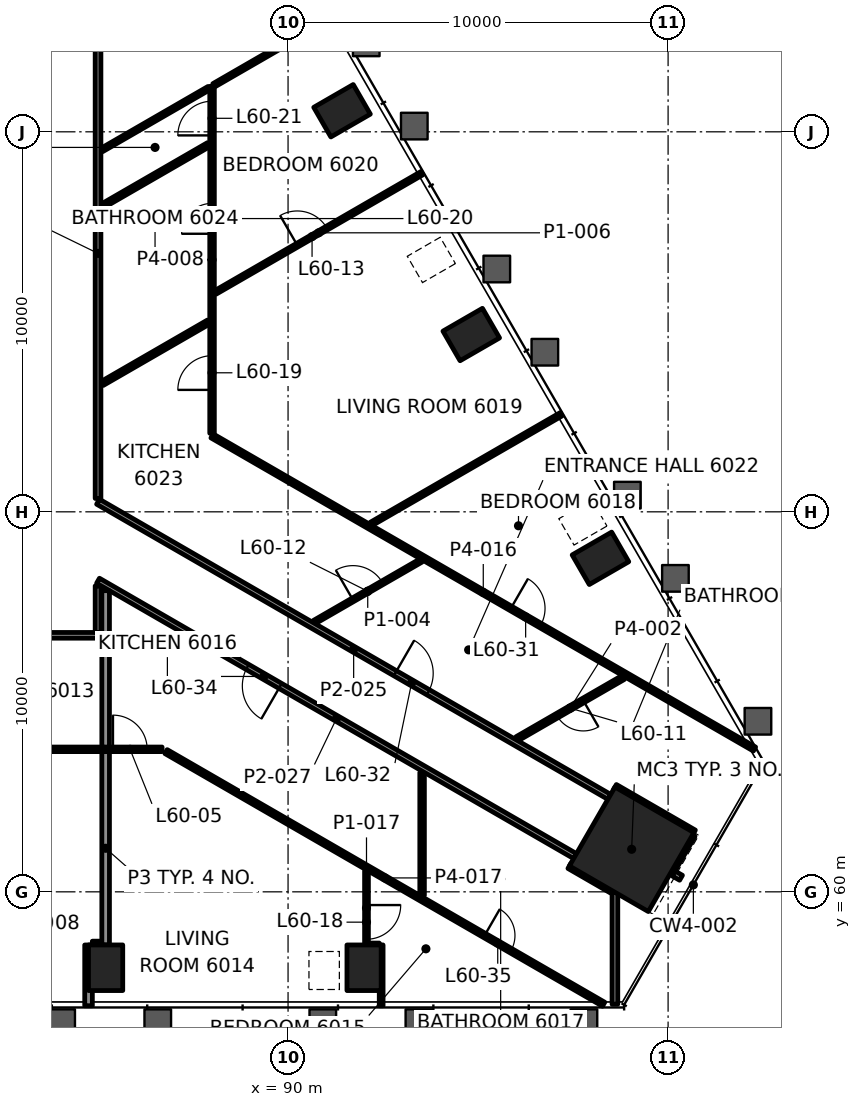
"""IFC4 building model, lengths in metres.
Left out: names, types, materials, properties, quantities, classifications, styles, units other than length and angle.
Written with IfcOpenShell. Run it as: python <this file> out.ifc"""

import sys

from ifc_helpers import new_model, si_unit, direction, frame, frame_2d, origin, origin_2d, place, context, subcontext, project, spatial, rectangle, hollow_rectangle, extrude, element, fill, save


model = new_model("IFC4")
c1 = context("Model", 3, precision=1e-05, world=origin(), true_north=direction((0.0, 1.0)))
c2 = subcontext(c1, "Body", "Model", "MODEL_VIEW")
j1 = project(units=[si_unit("LENGTHUNIT", "METRE"), si_unit("PLANEANGLEUNIT", "RADIAN")], contexts=[c1])
p1 = place(None, origin())
s1 = spatial("IfcSite", under=j1, at=p1, CompositionType="ELEMENT")
p2 = place(p1, origin())
s2 = spatial("IfcBuilding", under=s1, at=p2, CompositionType="ELEMENT")
p3 = place(p2, frame((0.0, 0.0, 256.6)))
s3 = spatial("IfcBuildingStorey", under=s2, at=p3, CompositionType="ELEMENT", Elevation=256.6)
p4 = place(p3, frame((99.041, 61.12, 0.0), z_axis=(0.0, 0.0, 1.0), x_axis=(0.5, 0.866025403784, 0.0)))
e1 = element("IfcColumn", 1, at=p4, inside=s3, PredefinedType="COLUMN", context=c2, shape_type="SweptSolid", body=[
    extrude(rectangle(XDim=2.4, YDim=2.4, at=origin_2d()), origin(), (0.0, 0.0, 1.0), 3.5),
])
for number, where, z_axis, x_axis in (
    (2, (85.2, 58.002, -0.0), (0.0, 0.0, 1.0), (1.0, 0.0, 0.0)),
    (3, (92.0, 58.002, -0.0), (0.0, 0.0, 1.0), (1.0, 0.0, 0.0)),
    (4, (98.22, 68.777, -0.0), (0.0, 0.0, 1.0), (-0.5, 0.866, 0.0)),
    (5, (94.821, 74.666, -0.0), (0.0, 0.0, 1.0), (-0.5, 0.866, 0.0)),
    (6, (91.421, 80.554, -0.0), (0.0, 0.0, 1.0), (-0.5, 0.866, 0.0)),
):
    element("IfcColumn", number, at=place(p3, frame(where, z_axis=z_axis, x_axis=x_axis)), inside=s3, PredefinedType="COLUMN", context=c2, shape_type="SweptSolid", body=[
        extrude(hollow_rectangle(XDim=0.9, YDim=1.2, WallThickness=0.06, at=origin_2d()), origin(), (0.0, 0.0, 1.0), 3.5),
    ])
p5 = place(p3, frame((84.851, 58.602, 0.0), z_axis=(0.0, 0.0, 1.0), x_axis=(1.0, 0.0, 0.0)))
e7 = element("IfcWall", 7, at=p5, inside=s3, PredefinedType="PARTITIONING", context=c2, shape_type="SweptSolid", body=[
    extrude(rectangle(XDim=0.249, YDim=0.2, at=frame_2d((0.125, 0.0))), origin(), (0.0, 0.0, 1.0), 2.7),
])
p6 = place(p3, frame((92.114, 58.602, 0.0), z_axis=(0.0, 0.0, 1.0), x_axis=(1.0, 0.0, 0.0)))
e8 = element("IfcWall", 8, at=p6, inside=s3, PredefinedType="PARTITIONING", context=c2, shape_type="SweptSolid", body=[
    extrude(rectangle(XDim=0.286, YDim=0.1, at=frame_2d((0.143, 0.0))), origin(), (0.0, 0.0, 1.0), 2.7),
])
p7 = place(p3, frame((63.314, 63.75, 0.0), z_axis=(0.0, 0.0, 1.0), x_axis=(1.0, 0.0, 0.0)))
e9 = element("IfcWall", 9, at=p7, inside=s3, PredefinedType="PARTITIONING", context=c2, shape_type="SweptSolid", body=[
    extrude(rectangle(XDim=23.371, YDim=0.12, at=frame_2d((11.686, 0.0))), origin(), (0.0, 0.0, 1.0), 2.7),
])
p8 = place(p7, frame((1.372, 0.0, 0.0)))
e10 = element("IfcOpeningElement", 10, at=p8, cuts=e9, PredefinedType="OPENING", context=c2, shape_type="SweptSolid", body=[
    extrude(rectangle(XDim=0.8, YDim=2.1, at=frame_2d((0.4, 1.05))), frame((0.0, 0.07, 0.0), z_axis=(0.0, -1.0, 0.0), x_axis=(1.0, 0.0, 0.0)), (0.0, 0.0, 1.0), 0.14),
])
p9 = place(p7, frame((6.249, 0.0, 0.0)))
e11 = element("IfcOpeningElement", 11, at=p9, cuts=e9, PredefinedType="OPENING", context=c2, shape_type="SweptSolid", body=[
    extrude(rectangle(XDim=0.9, YDim=2.1, at=frame_2d((0.45, 1.05))), frame((0.0, 0.07, 0.0), z_axis=(0.0, -1.0, 0.0), x_axis=(1.0, 0.0, 0.0)), (0.0, 0.0, 1.0), 0.14),
])
p10 = place(p7, frame((12.595, 0.0, 0.0)))
e12 = element("IfcOpeningElement", 12, at=p10, cuts=e9, PredefinedType="OPENING", context=c2, shape_type="SweptSolid", body=[
    extrude(rectangle(XDim=0.9, YDim=2.1, at=frame_2d((0.45, 1.05))), frame((0.0, 0.07, 0.0), z_axis=(0.0, -1.0, 0.0), x_axis=(1.0, 0.0, 0.0)), (0.0, 0.0, 1.0), 0.14),
])
p11 = place(p7, frame((18.992, 0.0, 0.0)))
e13 = element("IfcOpeningElement", 13, at=p11, cuts=e9, PredefinedType="OPENING", context=c2, shape_type="SweptSolid", body=[
    extrude(rectangle(XDim=0.8, YDim=2.1, at=frame_2d((0.4, 1.05))), frame((0.0, 0.07, 0.0), z_axis=(0.0, -1.0, 0.0), x_axis=(1.0, 0.0, 0.0)), (0.0, 0.0, 1.0), 0.14),
])
p12 = place(p7, frame((22.078, 0.0, 0.0)))
e14 = element("IfcOpeningElement", 14, at=p12, cuts=e9, PredefinedType="OPENING", context=c2, shape_type="SweptSolid", body=[
    extrude(rectangle(XDim=0.9, YDim=2.1, at=frame_2d((0.45, 1.05))), frame((0.0, 0.07, 0.0), z_axis=(0.0, -1.0, 0.0), x_axis=(1.0, 0.0, 0.0)), (0.0, 0.0, 1.0), 0.14),
])
p13 = place(p3, frame((85.0, 66.75, 0.0), z_axis=(0.0, 0.0, 1.0), x_axis=(-1.0, 0.0, 0.0)))
e15 = element("IfcWall", 15, at=p13, inside=s3, PredefinedType="PARTITIONING", context=c2, shape_type="SweptSolid", body=[
    extrude(rectangle(XDim=20.0, YDim=0.15, at=frame_2d((10.0, 0.0))), origin(), (0.0, 0.0, 1.0), 2.7),
])
p14 = place(p13, frame((14.487, 0.0, 0.0)))
e16 = element("IfcOpeningElement", 16, at=p14, cuts=e15, PredefinedType="OPENING", context=c2, shape_type="SweptSolid", body=[
    extrude(rectangle(XDim=1.0, YDim=2.1, at=frame_2d((0.5, 1.05))), frame((0.0, 0.085, 0.0), z_axis=(0.0, -1.0, 0.0), x_axis=(1.0, 0.0, 0.0)), (0.0, 0.0, 1.0), 0.17),
])
p15 = place(p3, frame((98.82, 65.641, 0.0), z_axis=(0.0, 0.0, 1.0), x_axis=(-0.866033195618, -0.499986503906, 0.0)))
e17 = element("IfcWall", 17, at=p15, inside=s3, PredefinedType="PARTITIONING", context=c2, shape_type="SweptSolid", body=[
    extrude(rectangle(XDim=3.228, YDim=0.12, at=frame_2d((1.614, 0.0))), origin(), (0.0, 0.0, 1.0), 2.7),
])
p16 = place(p15, frame((1.214, 0.0, 0.0)))
e18 = element("IfcOpeningElement", 18, at=p16, cuts=e17, PredefinedType="OPENING", context=c2, shape_type="SweptSolid", body=[
    extrude(rectangle(XDim=0.8, YDim=2.1, at=frame_2d((0.4, 1.05))), frame((0.0, 0.07, 0.0), z_axis=(0.0, -1.0, 0.0), x_axis=(1.0, 0.0, 0.0)), (0.0, 0.0, 1.0), 0.14),
])
p17 = place(p3, frame((90.69, 67.097, 0.0), z_axis=(0.0, 0.0, 1.0), x_axis=(0.86605167102, 0.499954501053, 0.0)))
e19 = element("IfcWall", 19, at=p17, inside=s3, PredefinedType="PARTITIONING", context=c2, shape_type="SweptSolid", body=[
    extrude(rectangle(XDim=3.248, YDim=0.1, at=frame_2d((1.624, 0.0))), origin(), (0.0, 0.0, 1.0), 2.7),
])
p18 = place(p17, frame((1.174, 0.0, 0.0)))
e20 = element("IfcOpeningElement", 20, at=p18, cuts=e19, PredefinedType="OPENING", context=c2, shape_type="SweptSolid", body=[
    extrude(rectangle(XDim=0.9, YDim=2.1, at=frame_2d((0.45, 1.05))), frame((0.0, 0.06, 0.0), z_axis=(0.0, -1.0, 0.0), x_axis=(1.0, 0.0, 0.0)), (0.0, 0.0, 1.0), 0.12),
])
p19 = place(p3, frame((92.186, 69.68, 0.0), z_axis=(0.0, 0.0, 1.0), x_axis=(0.866022942541, 0.500004262974, 0.0)))
e21 = element("IfcWall", 21, at=p19, inside=s3, PredefinedType="PARTITIONING", context=c2, shape_type="SweptSolid", body=[
    extrude(rectangle(XDim=5.774, YDim=0.1, at=frame_2d((2.887, 0.0))), origin(), (0.0, 0.0, 1.0), 2.688),
])
p20 = place(p3, frame((85.11, 73.379, 0.0), z_axis=(0.0, 0.0, 1.0), x_axis=(0.866000447062, 0.500043223821, 0.0)))
e22 = element("IfcWall", 22, at=p20, inside=s3, PredefinedType="PARTITIONING", context=c2, shape_type="SweptSolid", body=[
    extrude(rectangle(XDim=3.228, YDim=0.12, at=frame_2d((1.614, 0.0))), origin(), (0.0, 0.0, 1.0), 2.7),
])
p21 = place(p3, frame((88.086, 75.773, 0.0), z_axis=(0.0, 0.0, 1.0), x_axis=(0.866028229963, 0.499995104884, 0.0)))
e23 = element("IfcWall", 23, at=p21, inside=s3, PredefinedType="PARTITIONING", context=c2, shape_type="SweptSolid", body=[
    extrude(rectangle(XDim=6.278, YDim=0.1, at=frame_2d((3.139, 0.0))), origin(), (0.0, 0.0, 1.0), 2.688),
])
p22 = place(p21, frame((2.489, 0.0, 0.0)))
e24 = element("IfcOpeningElement", 24, at=p22, cuts=e23, PredefinedType="OPENING", context=c2, shape_type="SweptSolid", body=[
    extrude(rectangle(XDim=0.9, YDim=2.1, at=frame_2d((0.45, 1.05))), frame((0.0, 0.06, 0.0), z_axis=(0.0, -1.0, 0.0), x_axis=(1.0, 0.0, 0.0)), (0.0, 0.0, 1.0), 0.12),
])
p23 = place(p3, frame((85.109, 78.046, 0.0), z_axis=(0.0, 0.0, 1.0), x_axis=(0.866033195618, 0.499986503906, 0.0)))
e25 = element("IfcWall", 25, at=p23, inside=s3, PredefinedType="PARTITIONING", context=c2, shape_type="SweptSolid", body=[
    extrude(rectangle(XDim=3.228, YDim=0.12, at=frame_2d((1.614, 0.0))), origin(), (0.0, 0.0, 1.0), 2.7),
])
p24 = place(p3, frame((85.101, 79.523, 0.0), z_axis=(0.0, 0.0, 1.0), x_axis=(0.866029195513, 0.499993432475, 0.0)))
e26 = element("IfcWall", 26, at=p24, inside=s3, PredefinedType="PARTITIONING", context=c2, shape_type="SweptSolid", body=[
    extrude(rectangle(XDim=3.25, YDim=0.1, at=frame_2d((1.625, 0.0))), origin(), (0.0, 0.0, 1.0), 2.7),
])
p25 = place(p3, frame((100.08, 60.52, 0.0), z_axis=(0.0, 0.0, 1.0), x_axis=(0.500060622324, 0.86599040064, 0.0)))
e27 = element("IfcWall", 27, at=p25, inside=s3, PredefinedType="PARTITIONING", context=c2, shape_type="SweptSolid", body=[
    extrude(rectangle(XDim=1.125, YDim=0.15, at=frame_2d((0.562, 0.0))), origin(), (0.0, 0.0, 1.0), 2.7),
])
p26 = place(p3, frame((98.601, 57.042, 0.0), z_axis=(0.0, 0.0, 1.0), x_axis=(0.0, 1.0, 0.0)))
e28 = element("IfcWall", 28, at=p26, inside=s3, PredefinedType="PARTITIONING", context=c2, shape_type="SweptSolid", body=[
    extrude(rectangle(XDim=2.946, YDim=0.15, at=frame_2d((1.473, 0.0))), origin(), (0.0, 0.0, 1.0), 2.7),
])
p27 = place(p3, frame((93.527, 59.909, 0.0), z_axis=(0.0, 0.0, 1.0), x_axis=(0.0, 1.0, 0.0)))
e29 = element("IfcWall", 29, at=p27, inside=s3, PredefinedType="PARTITIONING", context=c2, shape_type="SweptSolid", body=[
    extrude(rectangle(XDim=3.228, YDim=0.12, at=frame_2d((1.614, 0.0))), origin(), (0.0, 0.0, 1.0), 2.7),
])
p28 = place(p3, frame((92.45, 57.002, 0.0), z_axis=(0.0, 0.0, 1.0), x_axis=(0.0, 1.0, 0.0)))
e30 = element("IfcWall", 30, at=p28, inside=s3, PredefinedType="PARTITIONING", context=c2, shape_type="SweptSolid", body=[
    extrude(rectangle(XDim=1.6, YDim=0.1, at=frame_2d((0.8, 0.0))), origin(), (0.0, 0.0, 1.0), 2.7),
])
p29 = place(p3, frame((92.064, 60.545, 0.0), z_axis=(0.0, 0.0, 1.0), x_axis=(0.0, -1.0, 0.0)))
e31 = element("IfcWall", 31, at=p29, inside=s3, PredefinedType="PARTITIONING", context=c2, shape_type="SweptSolid", body=[
    extrude(rectangle(XDim=1.943, YDim=0.1, at=frame_2d((0.972, 0.0))), origin(), (0.0, 0.0, 1.0), 2.7),
])
p30 = place(p29, frame((0.893, 0.0, 0.0)))
e32 = element("IfcOpeningElement", 32, at=p30, cuts=e31, PredefinedType="OPENING", context=c2, shape_type="SweptSolid", body=[
    extrude(rectangle(XDim=0.9, YDim=2.1, at=frame_2d((0.45, 1.05))), frame((0.0, 0.06, 0.0), z_axis=(0.0, -1.0, 0.0), x_axis=(1.0, 0.0, 0.0)), (0.0, 0.0, 1.0), 0.12),
])
p31 = place(p3, frame((88.0, 72.067, 0.0), z_axis=(0.0, 0.0, 1.0), x_axis=(0.0, 1.0, 0.0)))
e33 = element("IfcWall", 33, at=p31, inside=s3, PredefinedType="PARTITIONING", context=c2, shape_type="SweptSolid", body=[
    extrude(rectangle(XDim=9.13, YDim=0.12, at=frame_2d((4.565, 0.0))), origin(), (0.0, 0.0, 1.0), 2.7),
])
p32 = place(p31, frame((1.142, 0.0, 0.0)))
e34 = element("IfcOpeningElement", 34, at=p32, cuts=e33, PredefinedType="OPENING", context=c2, shape_type="SweptSolid", body=[
    extrude(rectangle(XDim=0.9, YDim=2.1, at=frame_2d((0.45, 1.05))), frame((0.0, 0.07, 0.0), z_axis=(0.0, -1.0, 0.0), x_axis=(1.0, 0.0, 0.0)), (0.0, 0.0, 1.0), 0.14),
])
p33 = place(p31, frame((5.25, 0.0, 0.0)))
e35 = element("IfcOpeningElement", 35, at=p33, cuts=e33, PredefinedType="OPENING", context=c2, shape_type="SweptSolid", body=[
    extrude(rectangle(XDim=0.8, YDim=2.1, at=frame_2d((0.4, 1.05))), frame((0.0, 0.07, 0.0), z_axis=(0.0, -1.0, 0.0), x_axis=(1.0, 0.0, 0.0)), (0.0, 0.0, 1.0), 0.14),
])
p34 = place(p31, frame((7.838, 0.0, 0.0)))
e36 = element("IfcOpeningElement", 36, at=p34, cuts=e33, PredefinedType="OPENING", context=c2, shape_type="SweptSolid", body=[
    extrude(rectangle(XDim=0.9, YDim=2.1, at=frame_2d((0.45, 1.05))), frame((0.0, 0.07, 0.0), z_axis=(0.0, -1.0, 0.0), x_axis=(1.0, 0.0, 0.0)), (0.0, 0.0, 1.0), 0.14),
])
p35 = place(p3, frame((85.2, 58.603, 0.0), z_axis=(0.0, 0.0, 1.0), x_axis=(0.0, 1.0, 0.0)))
e37 = element("IfcWall", 37, at=p35, inside=s3, PredefinedType="PARTITIONING", context=c2, shape_type="SweptSolid", body=[
    extrude(rectangle(XDim=5.087, YDim=0.2, at=frame_2d((2.544, 0.0))), origin(), (0.0, 0.0, 1.0), 2.7),
])
p36 = place(p3, frame((85.0, 66.825, 0.0), z_axis=(0.0, 0.0, 1.0), x_axis=(0.0, 1.0, 0.0)))
e38 = element("IfcWall", 38, at=p36, inside=s3, PredefinedType="PARTITIONING", context=c2, shape_type="SweptSolid", body=[
    extrude(rectangle(XDim=1.226, YDim=0.15, at=frame_2d((0.613, 0.0))), origin(), (0.0, 0.0, 1.0), 2.547),
])
p37 = place(p3, frame((85.0, 70.352, 0.0), z_axis=(0.0, 0.0, 1.0), x_axis=(0.0, 1.0, 0.0)))
e39 = element("IfcWall", 39, at=p37, inside=s3, PredefinedType="PARTITIONING", context=c2, shape_type="SweptSolid", body=[
    extrude(rectangle(XDim=12.897, YDim=0.15, at=frame_2d((6.449, 0.0))), origin(), (0.0, 0.0, 1.0), 2.7),
])
p38 = place(p3, frame((84.75, 57.002, 0.0), z_axis=(0.0, 0.0, 1.0), x_axis=(0.0, 1.0, 0.0)))
e40 = element("IfcWall", 40, at=p38, inside=s3, PredefinedType="PARTITIONING", context=c2, shape_type="SweptSolid", body=[
    extrude(rectangle(XDim=1.599, YDim=0.2, at=frame_2d((0.8, 0.0))), origin(), (0.0, 0.0, 1.0), 2.688),
])
p39 = place(p3, frame((88.0, 71.998, 0.0), z_axis=(0.0, 0.0, 1.0), x_axis=(0.866029437016, -0.499993014173, 0.0)))
e41 = element("IfcWall", 41, at=p39, inside=s3, PredefinedType="PARTITIONING", context=c2, shape_type="SweptSolid", body=[
    extrude(rectangle(XDim=16.481, YDim=0.12, at=frame_2d((8.241, 0.0))), origin(), (0.0, 0.0, 1.0), 2.7),
])
p40 = place(p39, frame((9.078, 0.0, 0.0)))
e42 = element("IfcOpeningElement", 42, at=p40, cuts=e41, PredefinedType="OPENING", context=c2, shape_type="SweptSolid", body=[
    extrude(rectangle(XDim=0.9, YDim=2.1, at=frame_2d((0.45, 1.05))), frame((0.0, 0.07, 0.0), z_axis=(0.0, -1.0, 0.0), x_axis=(1.0, 0.0, 0.0)), (0.0, 0.0, 1.0), 0.14),
])
p41 = place(p3, frame((100.68, 61.559, 0.0), z_axis=(0.0, 0.0, 1.0), x_axis=(-0.866024647952, 0.500001309137, 0.0)))
e43 = element("IfcWall", 43, at=p41, inside=s3, PredefinedType="PARTITIONING", context=c2, shape_type="SweptSolid", body=[
    extrude(rectangle(XDim=2.4, YDim=0.15, at=frame_2d((1.2, 0.0))), origin(), (0.0, 0.0, 1.0), 2.7),
])
p42 = place(p3, frame((85.0, 70.266, 0.0), z_axis=(0.0, 0.0, 1.0), x_axis=(0.866021473228, -0.500006807861, 0.0)))
e44 = element("IfcWall", 44, at=p42, inside=s3, PredefinedType="PARTITIONING", context=c2, shape_type="SweptSolid", body=[
    extrude(rectangle(XDim=15.533, YDim=0.15, at=frame_2d((7.767, 0.0))), origin(), (0.0, 0.0, 1.0), 2.7),
])
p43 = place(p42, frame((9.029, 0.0, 0.0)))
e45 = element("IfcOpeningElement", 45, at=p43, cuts=e44, PredefinedType="OPENING", context=c2, shape_type="SweptSolid", body=[
    extrude(rectangle(XDim=1.0, YDim=2.1, at=frame_2d((0.5, 1.05))), frame((0.0, 0.085, 0.0), z_axis=(0.0, -1.0, 0.0), x_axis=(1.0, 0.0, 0.0)), (0.0, 0.0, 1.0), 0.17),
])
p44 = place(p3, frame((100.34, 60.37, 0.0), z_axis=(0.0, 0.0, 1.0), x_axis=(-0.866167537795, 0.499753735824, 0.0)))
e46 = element("IfcWall", 46, at=p44, inside=s3, PredefinedType="PARTITIONING", context=c2, shape_type="SweptSolid", body=[
    extrude(rectangle(XDim=0.225, YDim=0.15, at=frame_2d((0.113, 0.0))), origin(), (0.0, 0.0, 1.0), 2.7),
])
p45 = place(p3, frame((97.552, 60.94, 0.0), z_axis=(0.0, 0.0, 1.0), x_axis=(-0.866027660432, 0.499996091351, 0.0)))
e47 = element("IfcWall", 47, at=p45, inside=s3, PredefinedType="PARTITIONING", context=c2, shape_type="SweptSolid", body=[
    extrude(rectangle(XDim=14.494, YDim=0.15, at=frame_2d((7.247, 0.0))), origin(), (0.0, 0.0, 1.0), 2.547),
])
p46 = place(p45, frame((8.955, 0.0, 0.0)))
e48 = element("IfcOpeningElement", 48, at=p46, cuts=e47, PredefinedType="OPENING", context=c2, shape_type="SweptSolid", body=[
    extrude(rectangle(XDim=1.0, YDim=2.1, at=frame_2d((0.5, 1.05))), frame((0.0, 0.085, 0.0), z_axis=(0.0, -1.0, 0.0), x_axis=(1.0, 0.0, 0.0)), (0.0, 0.0, 1.0), 0.17),
])
p47 = place(p3, frame((98.526, 60.032, 0.0), z_axis=(0.0, 0.0, 1.0), x_axis=(-0.866069663658, 0.499923331814, 0.0)))
e49 = element("IfcWall", 49, at=p47, inside=s3, PredefinedType="PARTITIONING", context=c2, shape_type="SweptSolid", body=[
    extrude(rectangle(XDim=1.298, YDim=0.15, at=frame_2d((0.649, 0.0))), origin(), (0.0, 0.0, 1.0), 2.7),
])
p48 = place(p3, frame((86.79, 63.69, 0.0), z_axis=(0.0, 0.0, 1.0), x_axis=(0.866026581292, -0.499997960491, 0.0)))
e50 = element("IfcWall", 50, at=p48, inside=s3, PredefinedType="PARTITIONING", context=c2, shape_type="SweptSolid", body=[
    extrude(rectangle(XDim=13.296, YDim=0.12, at=frame_2d((6.648, 0.0))), origin(), (0.0, 0.0, 1.0), 2.7),
])
p49 = place(p48, frame((9.678, 0.0, 0.0)))
e51 = element("IfcOpeningElement", 51, at=p49, cuts=e50, PredefinedType="OPENING", context=c2, shape_type="SweptSolid", body=[
    extrude(rectangle(XDim=0.8, YDim=2.1, at=frame_2d((0.4, 1.05))), frame((0.0, 0.07, 0.0), z_axis=(0.0, -1.0, 0.0), x_axis=(1.0, 0.0, 0.0)), (0.0, 0.0, 1.0), 0.14),
])
p50 = place(p3, frame((85.2, 63.81, 0.0), z_axis=(0.0, 0.0, 1.0), x_axis=(0.0, 1.0, 0.0)))
e52 = element("IfcWall", 52, at=p50, inside=s3, PredefinedType="PARTITIONING", context=c2, shape_type="SweptSolid", body=[
    extrude(rectangle(XDim=4.115, YDim=0.2, at=frame_2d((2.058, 0.0))), origin(), (0.0, 0.0, 1.0), 2.547),
])
p51 = place(p3, frame((88.045, 81.223, 0.0), z_axis=(0.0, 0.0, 1.0), x_axis=(0.866020209003, 0.500008997517, 0.0)))
e53 = element("IfcWall", 53, at=p51, inside=s3, PredefinedType="PARTITIONING", context=c2, shape_type="SweptSolid", body=[
    extrude(rectangle(XDim=3.589, YDim=0.1, at=frame_2d((1.795, 0.0))), origin(), (0.0, 0.0, 1.0), 2.688),
])
p52 = place(p12, origin())
e54 = element("IfcDoor", 54, at=p52, inside=s3, OperationType="SINGLE_SWING_RIGHT", PredefinedType="DOOR", context=c2, shape_type="SweptSolid", body=[
    extrude(rectangle(XDim=0.9, YDim=2.1, at=frame_2d((0.45, 1.05))), frame((0.0, 0.025, 0.0), z_axis=(0.0, -1.0, 0.0), x_axis=(1.0, 0.0, 0.0)), (0.0, 0.0, 1.0), 0.05),
])
fill(e14, e54)
p53 = place(p16, origin())
e55 = element("IfcDoor", 55, at=p53, inside=s3, OperationType="SINGLE_SWING_RIGHT", PredefinedType="DOOR", context=c2, shape_type="SweptSolid", body=[
    extrude(rectangle(XDim=0.8, YDim=2.1, at=frame_2d((0.4, 1.05))), frame((0.0, 0.025, 0.0), z_axis=(0.0, -1.0, 0.0), x_axis=(1.0, 0.0, 0.0)), (0.0, 0.0, 1.0), 0.05),
])
fill(e18, e55)
p54 = place(p18, origin())
e56 = element("IfcDoor", 56, at=p54, inside=s3, OperationType="SINGLE_SWING_LEFT", PredefinedType="DOOR", context=c2, shape_type="SweptSolid", body=[
    extrude(rectangle(XDim=0.9, YDim=2.1, at=frame_2d((0.45, 1.05))), frame((0.0, 0.025, 0.0), z_axis=(0.0, -1.0, 0.0), x_axis=(1.0, 0.0, 0.0)), (0.0, 0.0, 1.0), 0.05),
])
fill(e20, e56)
p55 = place(p22, origin())
e57 = element("IfcDoor", 57, at=p55, inside=s3, OperationType="SINGLE_SWING_LEFT", PredefinedType="DOOR", context=c2, shape_type="SweptSolid", body=[
    extrude(rectangle(XDim=0.9, YDim=2.1, at=frame_2d((0.45, 1.05))), frame((0.0, 0.025, 0.0), z_axis=(0.0, -1.0, 0.0), x_axis=(1.0, 0.0, 0.0)), (0.0, 0.0, 1.0), 0.05),
])
fill(e24, e57)
p56 = place(p30, origin())
e58 = element("IfcDoor", 58, at=p56, inside=s3, OperationType="SINGLE_SWING_RIGHT", PredefinedType="DOOR", context=c2, shape_type="SweptSolid", body=[
    extrude(rectangle(XDim=0.9, YDim=2.1, at=frame_2d((0.45, 1.05))), frame((0.0, 0.025, 0.0), z_axis=(0.0, -1.0, 0.0), x_axis=(1.0, 0.0, 0.0)), (0.0, 0.0, 1.0), 0.05),
])
fill(e32, e58)
p57 = place(p32, origin())
e59 = element("IfcDoor", 59, at=p57, inside=s3, OperationType="SINGLE_SWING_RIGHT", PredefinedType="DOOR", context=c2, shape_type="SweptSolid", body=[
    extrude(rectangle(XDim=0.9, YDim=2.1, at=frame_2d((0.45, 1.05))), frame((0.0, 0.025, 0.0), z_axis=(0.0, -1.0, 0.0), x_axis=(1.0, 0.0, 0.0)), (0.0, 0.0, 1.0), 0.05),
])
fill(e34, e59)
p58 = place(p33, origin())
e60 = element("IfcDoor", 60, at=p58, inside=s3, OperationType="SINGLE_SWING_LEFT", PredefinedType="DOOR", context=c2, shape_type="SweptSolid", body=[
    extrude(rectangle(XDim=0.8, YDim=2.1, at=frame_2d((0.4, 1.05))), frame((0.0, 0.025, 0.0), z_axis=(0.0, -1.0, 0.0), x_axis=(1.0, 0.0, 0.0)), (0.0, 0.0, 1.0), 0.05),
])
fill(e35, e60)
p59 = place(p34, origin())
e61 = element("IfcDoor", 61, at=p59, inside=s3, OperationType="SINGLE_SWING_RIGHT", PredefinedType="DOOR", context=c2, shape_type="SweptSolid", body=[
    extrude(rectangle(XDim=0.9, YDim=2.1, at=frame_2d((0.45, 1.05))), frame((0.0, 0.025, 0.0), z_axis=(0.0, -1.0, 0.0), x_axis=(1.0, 0.0, 0.0)), (0.0, 0.0, 1.0), 0.05),
])
fill(e36, e61)
p60 = place(p40, origin())
e62 = element("IfcDoor", 62, at=p60, inside=s3, OperationType="SINGLE_SWING_LEFT", PredefinedType="DOOR", context=c2, shape_type="SweptSolid", body=[
    extrude(rectangle(XDim=0.9, YDim=2.1, at=frame_2d((0.45, 1.05))), frame((0.0, 0.025, 0.0), z_axis=(0.0, -1.0, 0.0), x_axis=(1.0, 0.0, 0.0)), (0.0, 0.0, 1.0), 0.05),
])
fill(e42, e62)
p61 = place(p43, origin())
e63 = element("IfcDoor", 63, at=p61, inside=s3, OperationType="SINGLE_SWING_LEFT", PredefinedType="DOOR", context=c2, shape_type="SweptSolid", body=[
    extrude(rectangle(XDim=1.0, YDim=2.1, at=frame_2d((0.5, 1.05))), frame((0.0, 0.025, 0.0), z_axis=(0.0, -1.0, 0.0), x_axis=(1.0, 0.0, 0.0)), (0.0, 0.0, 1.0), 0.05),
])
fill(e45, e63)
p62 = place(p46, origin())
e64 = element("IfcDoor", 64, at=p62, inside=s3, OperationType="SINGLE_SWING_LEFT", PredefinedType="DOOR", context=c2, shape_type="SweptSolid", body=[
    extrude(rectangle(XDim=1.0, YDim=2.1, at=frame_2d((0.5, 1.05))), frame((0.0, 0.025, 0.0), z_axis=(0.0, -1.0, 0.0), x_axis=(1.0, 0.0, 0.0)), (0.0, 0.0, 1.0), 0.05),
])
fill(e48, e64)
p63 = place(p49, origin())
e65 = element("IfcDoor", 65, at=p63, inside=s3, OperationType="SINGLE_SWING_LEFT", PredefinedType="DOOR", context=c2, shape_type="SweptSolid", body=[
    extrude(rectangle(XDim=0.8, YDim=2.1, at=frame_2d((0.4, 1.05))), frame((0.0, 0.025, 0.0), z_axis=(0.0, -1.0, 0.0), x_axis=(1.0, 0.0, 0.0)), (0.0, 0.0, 1.0), 0.05),
])
fill(e51, e65)
save(model, sys.argv[1])
